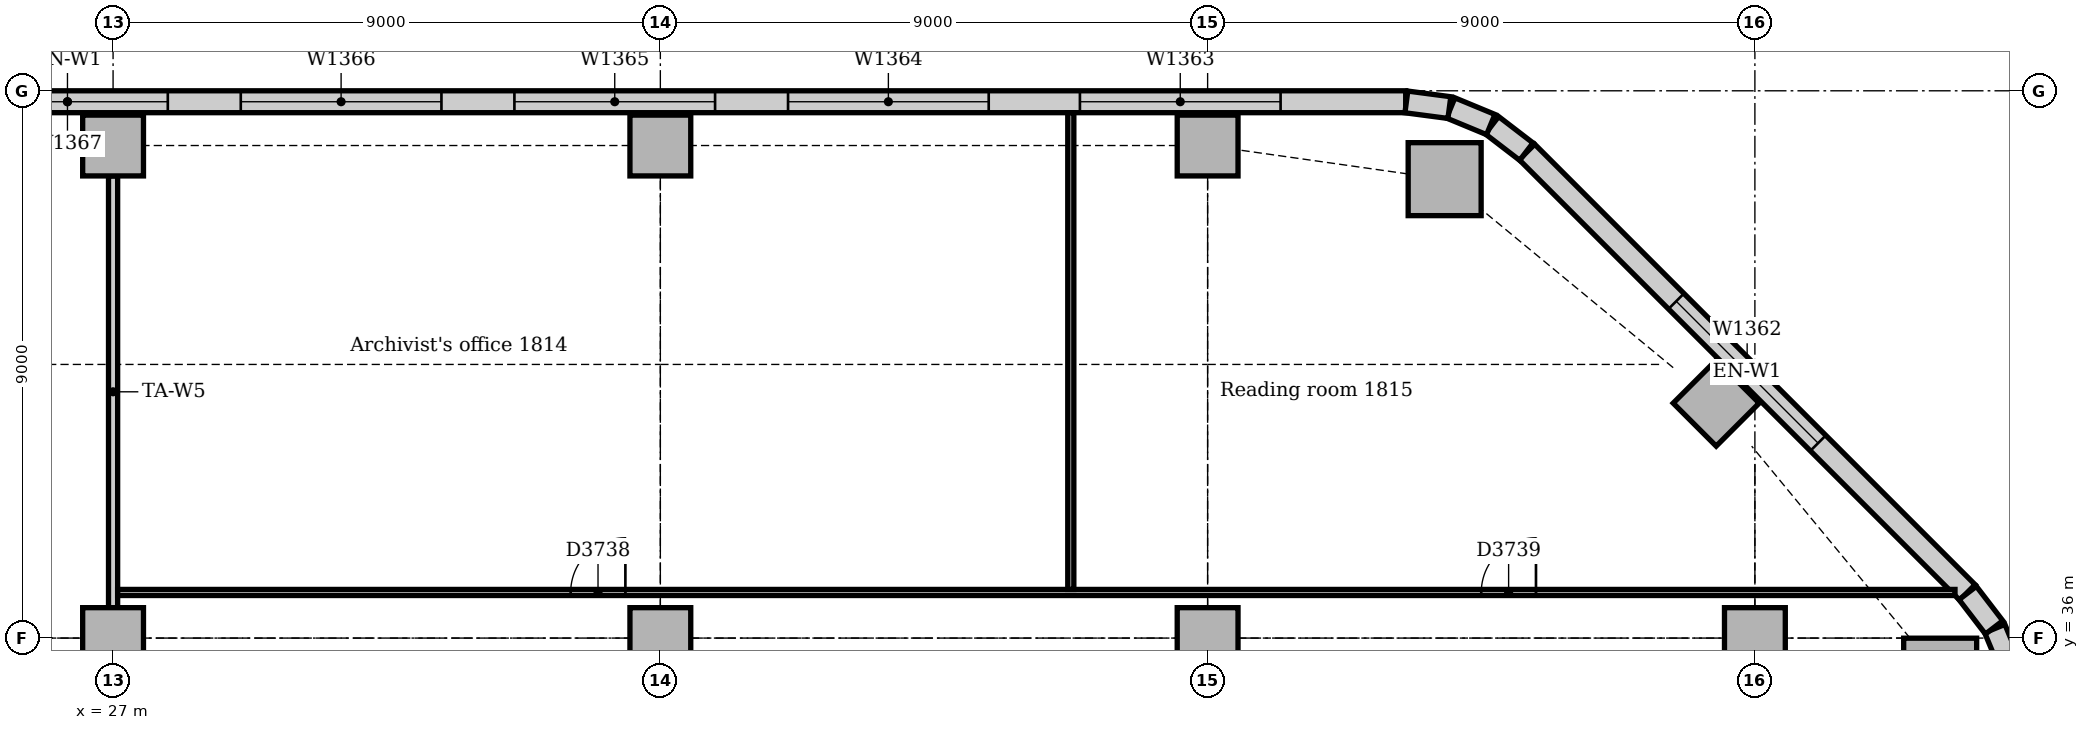
"""IFC4 building model, lengths in metres.
Left out: names, types, materials, properties, quantities, classifications, styles, units other than length and angle.
Written with IfcOpenShell. Run it as: python <this file> out.ifc"""

import sys

from ifc_helpers import new_model, si_unit, direction, frame, frame_2d, origin, origin_2d, place, context, subcontext, project, spatial, rectangle, extrude, element, fill, save


model = new_model("IFC4")
c1 = context("Model", 3, precision=1e-05, world=origin(), true_north=direction((0.0, 1.0)))
c2 = subcontext(c1, "Body", "Model", "MODEL_VIEW")
j1 = project(units=[si_unit("LENGTHUNIT", "METRE"), si_unit("PLANEANGLEUNIT", "RADIAN")], contexts=[c1])
p1 = place(None, origin())
s1 = spatial("IfcSite", under=j1, at=p1, CompositionType="ELEMENT")
p2 = place(p1, origin())
s2 = spatial("IfcBuilding", under=s1, at=p2, CompositionType="ELEMENT")
p3 = place(p2, frame((0.0, 0.0, 79.0)))
s3 = spatial("IfcBuildingStorey", under=s2, at=p3, CompositionType="ELEMENT", Elevation=79.0)
for number, where, z_axis, x_axis in (
    (1, (57.047, 35.398, 0.0), (0.0, 0.0, 1.0), (1.0, 0.0, 0.0)),
    (2, (48.898, 43.547, 0.0), (0.0, 0.0, 1.0), (1.0, 0.0, 0.0)),
):
    element("IfcColumn", number, at=place(p3, frame(where, z_axis=z_axis, x_axis=x_axis)), inside=s3, PredefinedType="COLUMN", context=c2, shape_type="SweptSolid", body=[
        extrude(rectangle(XDim=1.2, YDim=1.2, at=origin_2d()), origin(), (0.0, 0.0, 1.0), 3.85),
    ])
for number, where, z_axis, x_axis in (
    (3, (53.364, 39.864, 0.0), (0.0, 0.0, 1.0), (0.707, 0.707, 0.0)),
    (4, (27.0, 44.1, 0.0), (0.0, 0.0, 1.0), (1.0, 0.0, 0.0)),
    (5, (36.0, 44.1, 0.0), (0.0, 0.0, 1.0), (1.0, 0.0, 0.0)),
    (6, (45.0, 44.1, 0.0), (0.0, 0.0, 1.0), (1.0, 0.0, 0.0)),
    (7, (27.0, 36.0, 0.0), (0.0, 0.0, 1.0), (1.0, 0.0, 0.0)),
    (8, (36.0, 36.0, 0.0), (0.0, 0.0, 1.0), (1.0, 0.0, 0.0)),
    (9, (45.0, 36.0, 0.0), (0.0, 0.0, 1.0), (1.0, 0.0, 0.0)),
    (10, (54.0, 36.0, 0.0), (0.0, 0.0, 1.0), (1.0, 0.0, 0.0)),
):
    element("IfcColumn", number, at=place(p3, frame(where, z_axis=z_axis, x_axis=x_axis)), inside=s3, PredefinedType="COLUMN", context=c2, shape_type="SweptSolid", body=[
        extrude(rectangle(XDim=1.0, YDim=1.0, at=origin_2d()), origin(), (0.0, 0.0, 1.0), 3.85),
    ])
p4 = place(p3, frame((57.494, 36.751, 0.0), z_axis=(0.0, 0.0, 1.0), x_axis=(-0.707106781187, 0.707106781187, 0.0)))
e11 = element("IfcWall", 11, at=p4, inside=s3, PredefinedType="STANDARD", context=c2, shape_type="SweptSolid", body=[
    extrude(rectangle(XDim=10.243, YDim=0.36, at=frame_2d((5.121, 0.0))), origin(), (0.0, 0.0, 1.0), 3.85),
])
p5 = place(p4, frame((3.471, 0.0, 0.9)))
e12 = element("IfcOpeningElement", 12, at=p5, cuts=e11, PredefinedType="OPENING", context=c2, shape_type="SweptSolid", body=[
    extrude(rectangle(XDim=3.3, YDim=1.6, at=frame_2d((1.65, 0.8))), frame((0.0, 0.19, 0.0), z_axis=(0.0, -1.0, 0.0), x_axis=(1.0, 0.0, 0.0)), (0.0, 0.0, 1.0), 0.38),
])
p6 = place(p3, frame((48.257, 44.82, 0.0), z_axis=(0.0, 0.0, 1.0), x_axis=(-1.0, 0.0, 0.0)))
e13 = element("IfcWall", 13, at=p6, inside=s3, PredefinedType="STANDARD", context=c2, shape_type="SweptSolid", body=[
    extrude(rectangle(XDim=44.015, YDim=0.36, at=frame_2d((22.007, 0.0))), origin(), (0.0, 0.0, 1.0), 3.85),
])
p7 = place(p6, frame((2.057, 0.0, 0.9)))
e14 = element("IfcOpeningElement", 14, at=p7, cuts=e13, PredefinedType="OPENING", context=c2, shape_type="SweptSolid", body=[
    extrude(rectangle(XDim=3.3, YDim=1.6, at=frame_2d((1.65, 0.8))), frame((0.0, 0.19, 0.0), z_axis=(0.0, -1.0, 0.0), x_axis=(1.0, 0.0, 0.0)), (0.0, 0.0, 1.0), 0.38),
])
p8 = place(p6, frame((6.857, 0.0, 0.9)))
e15 = element("IfcOpeningElement", 15, at=p8, cuts=e13, PredefinedType="OPENING", context=c2, shape_type="SweptSolid", body=[
    extrude(rectangle(XDim=3.3, YDim=1.6, at=frame_2d((1.65, 0.8))), frame((0.0, 0.19, 0.0), z_axis=(0.0, -1.0, 0.0), x_axis=(1.0, 0.0, 0.0)), (0.0, 0.0, 1.0), 0.38),
])
p9 = place(p6, frame((11.357, 0.0, 0.9)))
e16 = element("IfcOpeningElement", 16, at=p9, cuts=e13, PredefinedType="OPENING", context=c2, shape_type="SweptSolid", body=[
    extrude(rectangle(XDim=3.3, YDim=1.6, at=frame_2d((1.65, 0.8))), frame((0.0, 0.19, 0.0), z_axis=(0.0, -1.0, 0.0), x_axis=(1.0, 0.0, 0.0)), (0.0, 0.0, 1.0), 0.38),
])
p10 = place(p6, frame((15.857, 0.0, 0.9)))
e17 = element("IfcOpeningElement", 17, at=p10, cuts=e13, PredefinedType="OPENING", context=c2, shape_type="SweptSolid", body=[
    extrude(rectangle(XDim=3.3, YDim=1.6, at=frame_2d((1.65, 0.8))), frame((0.0, 0.19, 0.0), z_axis=(0.0, -1.0, 0.0), x_axis=(1.0, 0.0, 0.0)), (0.0, 0.0, 1.0), 0.38),
])
p11 = place(p6, frame((20.357, 0.0, 0.9)))
e18 = element("IfcOpeningElement", 18, at=p11, cuts=e13, PredefinedType="OPENING", context=c2, shape_type="SweptSolid", body=[
    extrude(rectangle(XDim=3.3, YDim=1.6, at=frame_2d((1.65, 0.8))), frame((0.0, 0.19, 0.0), z_axis=(0.0, -1.0, 0.0), x_axis=(1.0, 0.0, 0.0)), (0.0, 0.0, 1.0), 0.38),
])
p12 = place(p6, frame((25.957, 0.0, 0.9)))
e19 = element("IfcOpeningElement", 19, at=p12, cuts=e13, PredefinedType="OPENING", context=c2, shape_type="SweptSolid", body=[
    extrude(rectangle(XDim=1.8, YDim=1.6, at=frame_2d((0.9, 0.8))), frame((0.0, 0.19, 0.0), z_axis=(0.0, -1.0, 0.0), x_axis=(1.0, 0.0, 0.0)), (0.0, 0.0, 1.0), 0.38),
])
p13 = place(p6, frame((29.357, 0.0, 0.9)))
e20 = element("IfcOpeningElement", 20, at=p13, cuts=e13, PredefinedType="OPENING", context=c2, shape_type="SweptSolid", body=[
    extrude(rectangle(XDim=3.3, YDim=1.6, at=frame_2d((1.65, 0.8))), frame((0.0, 0.19, 0.0), z_axis=(0.0, -1.0, 0.0), x_axis=(1.0, 0.0, 0.0)), (0.0, 0.0, 1.0), 0.38),
])
p14 = place(p6, frame((33.857, 0.0, 0.9)))
e21 = element("IfcOpeningElement", 21, at=p14, cuts=e13, PredefinedType="OPENING", context=c2, shape_type="SweptSolid", body=[
    extrude(rectangle(XDim=3.3, YDim=1.6, at=frame_2d((1.65, 0.8))), frame((0.0, 0.19, 0.0), z_axis=(0.0, -1.0, 0.0), x_axis=(1.0, 0.0, 0.0)), (0.0, 0.0, 1.0), 0.38),
])
p15 = place(p6, frame((38.357, 0.0, 0.9)))
e22 = element("IfcOpeningElement", 22, at=p15, cuts=e13, PredefinedType="OPENING", context=c2, shape_type="SweptSolid", body=[
    extrude(rectangle(XDim=3.3, YDim=1.6, at=frame_2d((1.65, 0.8))), frame((0.0, 0.19, 0.0), z_axis=(0.0, -1.0, 0.0), x_axis=(1.0, 0.0, 0.0)), (0.0, 0.0, 1.0), 0.38),
])
p16 = place(p3, frame((58.218, 35.497, 0.0), z_axis=(0.0, 0.0, 1.0), x_axis=(-0.382702709855, 0.923871547278, 0.0)))
e23 = element("IfcWall", 23, at=p16, inside=s3, PredefinedType="STANDARD", context=c2, shape_type="SweptSolid", body=[
    extrude(rectangle(XDim=0.713, YDim=0.36, at=frame_2d((0.356, 0.0))), origin(), (0.0, 0.0, 1.0), 3.85),
])
for number, where, z_axis, x_axis in (
    (24, (57.934, 36.175, 0.0), (0.0, 0.0, 1.0), (-0.609, 0.793, 0.0)),
    (25, (50.241, 44.0, 0.0), (0.0, 0.0, 1.0), (-0.793, 0.609, 0.0)),
):
    element("IfcWall", number, at=place(p3, frame(where, z_axis=z_axis, x_axis=x_axis)), inside=s3, PredefinedType="STANDARD", context=c2, shape_type="SweptSolid", body=[
        extrude(rectangle(XDim=0.713, YDim=0.36, at=frame_2d((0.357, 0.0))), origin(), (0.0, 0.0, 1.0), 3.85),
    ])
for number, where, z_axis, x_axis in (
    (26, (49.656, 44.445, 0.0), (0.0, 0.0, 1.0), (-0.924, 0.383, 0.0)),
    (27, (48.976, 44.724, 0.0), (0.0, 0.0, 1.0), (-0.991, 0.131, 0.0)),
):
    element("IfcWall", number, at=place(p3, frame(where, z_axis=z_axis, x_axis=x_axis)), inside=s3, PredefinedType="STANDARD", context=c2, shape_type="SweptSolid", body=[
        extrude(rectangle(XDim=0.713, YDim=0.36, at=frame_2d((0.356, 0.0))), origin(), (0.0, 0.0, 1.0), 3.85),
    ])
p17 = place(p3, frame((27.0, 36.5, 0.0), z_axis=(0.0, 0.0, 1.0), x_axis=(0.0, 1.0, 0.0)))
e28 = element("IfcWall", 28, at=p17, inside=s3, PredefinedType="PARTITIONING", context=c2, shape_type="SweptSolid", body=[
    extrude(rectangle(XDim=7.1, YDim=0.15, at=frame_2d((3.55, 0.0))), origin(), (0.0, 0.0, 1.0), 3.158),
])
p18 = place(p3, frame((27.075, 36.75, 0.0), z_axis=(0.0, 0.0, 1.0), x_axis=(1.0, 0.0, 0.0)))
e29 = element("IfcWall", 29, at=p18, inside=s3, PredefinedType="PARTITIONING", context=c2, shape_type="SweptSolid", body=[
    extrude(rectangle(XDim=30.216, YDim=0.1, at=frame_2d((15.108, 0.0))), origin(), (0.0, 0.0, 1.0), 3.85),
])
p19 = place(p18, frame((7.45, 0.0, 0.0)))
e30 = element("IfcOpeningElement", 30, at=p19, cuts=e29, PredefinedType="OPENING", context=c2, shape_type="SweptSolid", body=[
    extrude(rectangle(XDim=0.9, YDim=2.1, at=frame_2d((0.45, 1.05))), frame((0.0, 0.06, 0.0), z_axis=(0.0, -1.0, 0.0), x_axis=(1.0, 0.0, 0.0)), (0.0, 0.0, 1.0), 0.12),
])
p20 = place(p18, frame((22.425, 0.0, 0.0)))
e31 = element("IfcOpeningElement", 31, at=p20, cuts=e29, PredefinedType="OPENING", context=c2, shape_type="SweptSolid", body=[
    extrude(rectangle(XDim=0.9, YDim=2.1, at=frame_2d((0.45, 1.05))), frame((0.0, 0.06, 0.0), z_axis=(0.0, -1.0, 0.0), x_axis=(1.0, 0.0, 0.0)), (0.0, 0.0, 1.0), 0.12),
])
p21 = place(p3, frame((42.75, 36.8, 0.0), z_axis=(0.0, 0.0, 1.0), x_axis=(0.0, 1.0, 0.0)))
e32 = element("IfcWall", 32, at=p21, inside=s3, PredefinedType="PARTITIONING", context=c2, shape_type="SweptSolid", body=[
    extrude(rectangle(XDim=7.84, YDim=0.1, at=frame_2d((3.92, 0.0))), origin(), (0.0, 0.0, 1.0), 3.85),
])
p22 = place(p5, origin())
e33 = element("IfcWindow", 33, at=p22, inside=s3, PartitioningType="SINGLE_PANEL", PredefinedType="WINDOW", context=c2, shape_type="SweptSolid", body=[
    extrude(rectangle(XDim=3.3, YDim=1.6, at=frame_2d((1.65, 0.8))), frame((0.0, 0.13, 0.0), z_axis=(0.0, -1.0, 0.0), x_axis=(1.0, 0.0, 0.0)), (0.0, 0.0, 1.0), 0.06),
])
fill(e12, e33)
p23 = place(p7, origin())
e34 = element("IfcWindow", 34, at=p23, inside=s3, PartitioningType="SINGLE_PANEL", PredefinedType="WINDOW", context=c2, shape_type="SweptSolid", body=[
    extrude(rectangle(XDim=3.3, YDim=1.6, at=frame_2d((1.65, 0.8))), frame((0.0, 0.13, 0.0), z_axis=(0.0, -1.0, 0.0), x_axis=(1.0, 0.0, 0.0)), (0.0, 0.0, 1.0), 0.06),
])
fill(e14, e34)
p24 = place(p8, origin())
e35 = element("IfcWindow", 35, at=p24, inside=s3, PartitioningType="SINGLE_PANEL", PredefinedType="WINDOW", context=c2, shape_type="SweptSolid", body=[
    extrude(rectangle(XDim=3.3, YDim=1.6, at=frame_2d((1.65, 0.8))), frame((0.0, 0.13, 0.0), z_axis=(0.0, -1.0, 0.0), x_axis=(1.0, 0.0, 0.0)), (0.0, 0.0, 1.0), 0.06),
])
fill(e15, e35)
p25 = place(p9, origin())
e36 = element("IfcWindow", 36, at=p25, inside=s3, PartitioningType="SINGLE_PANEL", PredefinedType="WINDOW", context=c2, shape_type="SweptSolid", body=[
    extrude(rectangle(XDim=3.3, YDim=1.6, at=frame_2d((1.65, 0.8))), frame((0.0, 0.13, 0.0), z_axis=(0.0, -1.0, 0.0), x_axis=(1.0, 0.0, 0.0)), (0.0, 0.0, 1.0), 0.06),
])
fill(e16, e36)
p26 = place(p10, origin())
e37 = element("IfcWindow", 37, at=p26, inside=s3, PartitioningType="SINGLE_PANEL", PredefinedType="WINDOW", context=c2, shape_type="SweptSolid", body=[
    extrude(rectangle(XDim=3.3, YDim=1.6, at=frame_2d((1.65, 0.8))), frame((0.0, 0.13, 0.0), z_axis=(0.0, -1.0, 0.0), x_axis=(1.0, 0.0, 0.0)), (0.0, 0.0, 1.0), 0.06),
])
fill(e17, e37)
p27 = place(p11, origin())
e38 = element("IfcWindow", 38, at=p27, inside=s3, PartitioningType="SINGLE_PANEL", PredefinedType="WINDOW", context=c2, shape_type="SweptSolid", body=[
    extrude(rectangle(XDim=3.3, YDim=1.6, at=frame_2d((1.65, 0.8))), frame((0.0, 0.13, 0.0), z_axis=(0.0, -1.0, 0.0), x_axis=(1.0, 0.0, 0.0)), (0.0, 0.0, 1.0), 0.06),
])
fill(e18, e38)
p28 = place(p19, origin())
e39 = element("IfcDoor", 39, at=p28, inside=s3, OperationType="SINGLE_SWING_RIGHT", PredefinedType="DOOR", context=c2, shape_type="SweptSolid", body=[
    extrude(rectangle(XDim=0.9, YDim=2.1, at=frame_2d((0.45, 1.05))), frame((0.0, 0.025, 0.0), z_axis=(0.0, -1.0, 0.0), x_axis=(1.0, 0.0, 0.0)), (0.0, 0.0, 1.0), 0.05),
])
fill(e30, e39)
p29 = place(p20, origin())
e40 = element("IfcDoor", 40, at=p29, inside=s3, OperationType="SINGLE_SWING_RIGHT", PredefinedType="DOOR", context=c2, shape_type="SweptSolid", body=[
    extrude(rectangle(XDim=0.9, YDim=2.1, at=frame_2d((0.45, 1.05))), frame((0.0, 0.025, 0.0), z_axis=(0.0, -1.0, 0.0), x_axis=(1.0, 0.0, 0.0)), (0.0, 0.0, 1.0), 0.05),
])
fill(e31, e40)
save(model, sys.argv[1])
